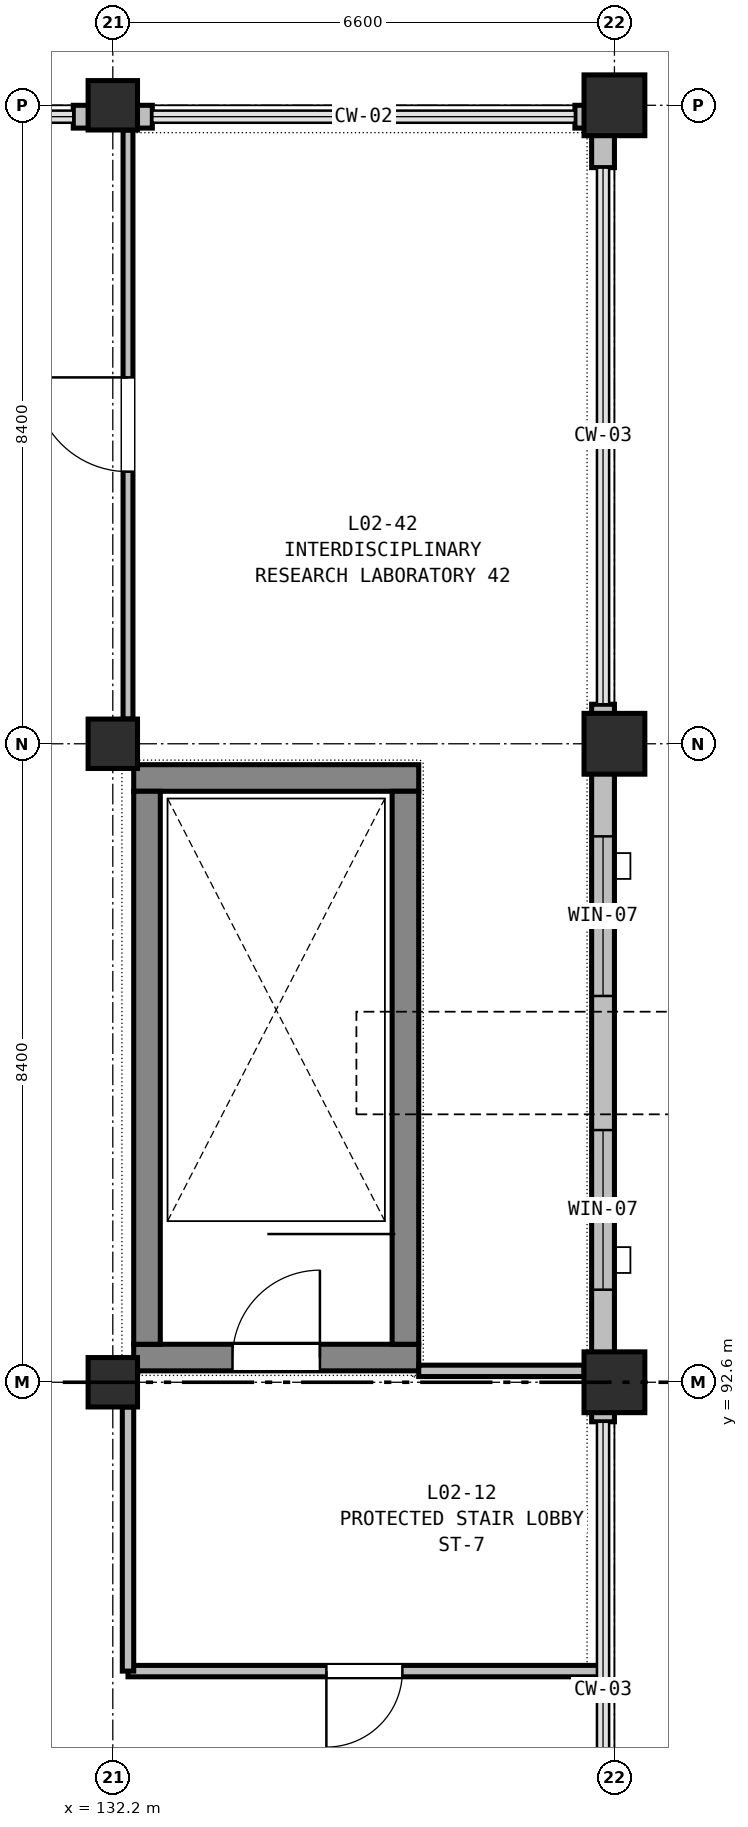
"""IFC4 building model, lengths in metres.
Left out: names, types, materials, properties, quantities, classifications, styles, units other than length and angle.
Written with IfcOpenShell. Run it as: python <this file> out.ifc"""

import sys

from ifc_helpers import new_model, si_unit, direction, frame, frame_2d, origin, origin_2d, place, context, subcontext, project, spatial, rectangle, extrude, element, fill, save


model = new_model("IFC4")
c1 = context("Model", 3, precision=1e-05, world=origin(), true_north=direction((0.0, 1.0)))
c2 = subcontext(c1, "Body", "Model", "MODEL_VIEW")
j1 = project(units=[si_unit("LENGTHUNIT", "METRE"), si_unit("PLANEANGLEUNIT", "RADIAN")], contexts=[c1])
p1 = place(None, origin())
s1 = spatial("IfcSite", under=j1, at=p1, CompositionType="ELEMENT")
p2 = place(p1, origin())
s2 = spatial("IfcBuilding", under=s1, at=p2, CompositionType="ELEMENT")
p3 = place(p2, frame((0.0, 0.0, 10.2)))
s3 = spatial("IfcBuildingStorey", under=s2, at=p3, CompositionType="ELEMENT", Elevation=10.2)
for number, where, z_axis, x_axis in (
    (1, (132.2, 92.6, 0.0), (0.0, 0.0, 1.0), (1.0, 0.0, 0.0)),
    (2, (132.2, 101.0, 0.0), (0.0, 0.0, 1.0), (1.0, 0.0, 0.0)),
    (3, (132.2, 109.4, 0.0), (0.0, 0.0, 1.0), (1.0, 0.0, 0.0)),
):
    element("IfcColumn", number, at=place(p3, frame(where, z_axis=z_axis, x_axis=x_axis)), inside=s3, PredefinedType="COLUMN", context=c2, shape_type="SweptSolid", body=[
        extrude(rectangle(XDim=0.65, YDim=0.65, at=origin_2d()), origin(), (0.0, 0.0, 1.0), 4.74),
    ])
for number, where, z_axis, x_axis in (
    (4, (138.8, 92.6, 0.0), (0.0, 0.0, 1.0), (1.0, 0.0, 0.0)),
    (5, (138.8, 101.0, 0.0), (0.0, 0.0, 1.0), (1.0, 0.0, 0.0)),
    (6, (138.8, 109.4, 0.0), (0.0, 0.0, 1.0), (1.0, 0.0, 0.0)),
):
    element("IfcColumn", number, at=place(p3, frame(where, z_axis=z_axis, x_axis=x_axis)), inside=s3, PredefinedType="COLUMN", context=c2, shape_type="SweptSolid", body=[
        extrude(rectangle(XDim=0.8, YDim=0.8, at=origin_2d()), origin(), (0.0, 0.0, 1.0), 4.74),
    ])
p4 = place(p3, frame((132.475, 92.925, 0.0), z_axis=(0.0, 0.0, 1.0), x_axis=(1.0, 0.0, 0.0)))
e7 = element("IfcWall", 7, at=p4, inside=s3, PredefinedType="SHEAR", context=c2, shape_type="SweptSolid", body=[
    extrude(rectangle(XDim=3.75, YDim=0.35, at=frame_2d((1.875, 0.0))), origin(), (0.0, 0.0, 1.0), 4.74),
])
p5 = place(p4, frame((1.3, 0.0, 0.0)))
e8 = element("IfcOpeningElement", 8, at=p5, cuts=e7, PredefinedType="OPENING", context=c2, shape_type="SweptSolid", body=[
    extrude(rectangle(XDim=1.15, YDim=2.15, at=frame_2d((0.575, 1.075))), frame((0.0, 0.185, 0.0), z_axis=(0.0, -1.0, 0.0), x_axis=(1.0, 0.0, 0.0)), (0.0, 0.0, 1.0), 0.37),
])
p6 = place(p3, frame((132.475, 100.55, 0.0), z_axis=(0.0, 0.0, 1.0), x_axis=(1.0, 0.0, 0.0)))
e9 = element("IfcWall", 9, at=p6, inside=s3, PredefinedType="SHEAR", context=c2, shape_type="SweptSolid", body=[
    extrude(rectangle(XDim=3.75, YDim=0.35, at=frame_2d((1.875, 0.0))), origin(), (0.0, 0.0, 1.0), 4.74),
])
for number, where, z_axis, x_axis in (
    (10, (132.65, 93.1, 0.0), (0.0, 0.0, 1.0), (0.0, 1.0, 0.0)),
    (11, (136.05, 93.1, 0.0), (0.0, 0.0, 1.0), (0.0, 1.0, 0.0)),
):
    element("IfcWall", number, at=place(p3, frame(where, z_axis=z_axis, x_axis=x_axis)), inside=s3, PredefinedType="SHEAR", context=c2, shape_type="SweptSolid", body=[
        extrude(rectangle(XDim=7.275, YDim=0.35, at=frame_2d((3.637, 0.0))), origin(), (0.0, 0.0, 1.0), 4.74),
    ])
for number, where, z_axis, x_axis in (
    (12, (131.68, 109.25, 0.0), (0.0, 0.0, 1.0), (1.0, 0.0, 0.0)),
    (13, (132.2, 109.25, 0.0), (0.0, 0.0, 1.0), (1.0, 0.0, 0.0)),
    (14, (138.28, 109.25, 0.0), (0.0, 0.0, 1.0), (1.0, 0.0, 0.0)),
    (15, (138.65, 109.1, 0.0), (0.0, 0.0, 1.0), (0.0, -1.0, 0.0)),
    (16, (138.65, 101.52, 0.0), (0.0, 0.0, 1.0), (0.0, -1.0, 0.0)),
):
    element("IfcWall", number, at=place(p3, frame(where, z_axis=z_axis, x_axis=x_axis)), inside=s3, PredefinedType="STANDARD", context=c2, shape_type="SweptSolid", body=[
        extrude(rectangle(XDim=0.52, YDim=0.3, at=frame_2d((0.26, 0.0))), origin(), (0.0, 0.0, 1.0), 3.935),
    ])
p7 = place(p3, frame((138.65, 101.0, 0.0), z_axis=(0.0, 0.0, 1.0), x_axis=(0.0, -1.0, 0.0)))
e17 = element("IfcWall", 17, at=p7, inside=s3, PredefinedType="STANDARD", context=c2, shape_type="SweptSolid", body=[
    extrude(rectangle(XDim=8.4, YDim=0.3, at=frame_2d((4.2, 0.0))), origin(), (0.0, 0.0, 1.0), 3.935),
])
p8 = place(p7, frame((1.218, 0.0, 0.9)))
e18 = element("IfcOpeningElement", 18, at=p8, cuts=e17, PredefinedType="OPENING", context=c2, shape_type="SweptSolid", body=[
    extrude(rectangle(XDim=2.1, YDim=2.1, at=frame_2d((1.05, 1.05))), frame((0.0, 0.16, 0.0), z_axis=(0.0, -1.0, 0.0), x_axis=(1.0, 0.0, 0.0)), (0.0, 0.0, 1.0), 0.32),
])
p9 = place(p7, frame((5.082, 0.0, 0.9)))
e19 = element("IfcOpeningElement", 19, at=p9, cuts=e17, PredefinedType="OPENING", context=c2, shape_type="SweptSolid", body=[
    extrude(rectangle(XDim=2.1, YDim=2.1, at=frame_2d((1.05, 1.05))), frame((0.0, 0.16, 0.0), z_axis=(0.0, -1.0, 0.0), x_axis=(1.0, 0.0, 0.0)), (0.0, 0.0, 1.0), 0.32),
])
p10 = place(p3, frame((138.65, 92.6, 0.0), z_axis=(0.0, 0.0, 1.0), x_axis=(0.0, -1.0, 0.0)))
e20 = element("IfcWall", 20, at=p10, inside=s3, PredefinedType="STANDARD", context=c2, shape_type="SweptSolid", body=[
    extrude(rectangle(XDim=0.52, YDim=0.3, at=frame_2d((0.26, 0.0))), origin(), (0.0, 0.0, 1.0), 3.935),
])
p11 = place(p3, frame((136.225, 92.75, 0.0), z_axis=(0.0, 0.0, 1.0), x_axis=(1.0, 0.0, 0.0)))
e21 = element("IfcWall", 21, at=p11, inside=s3, PredefinedType="PARTITIONING", context=c2, shape_type="SweptSolid", body=[
    extrude(rectangle(XDim=2.175, YDim=0.15, at=frame_2d((1.087, 0.0))), origin(), (0.0, 0.0, 1.0), 4.135),
])
p12 = place(p3, frame((138.62, 88.8, 0.0), z_axis=(0.0, 0.0, 1.0), x_axis=(-1.0, 0.0, 0.0)))
e22 = element("IfcWall", 22, at=p12, inside=s3, PredefinedType="PARTITIONING", context=c2, shape_type="SweptSolid", body=[
    extrude(rectangle(XDim=6.22, YDim=0.15, at=frame_2d((3.11, 0.0))), origin(), (0.0, 0.0, 1.0), 3.935),
])
p13 = place(p12, frame((2.61, 0.0, 0.0)))
e23 = element("IfcOpeningElement", 23, at=p13, cuts=e22, PredefinedType="OPENING", context=c2, shape_type="SweptSolid", body=[
    extrude(rectangle(XDim=1.0, YDim=2.1, at=frame_2d((0.5, 1.05))), frame((0.0, 0.085, 0.0), z_axis=(0.0, -1.0, 0.0), x_axis=(1.0, 0.0, 0.0)), (0.0, 0.0, 1.0), 0.17),
])
p14 = place(p3, frame((132.4, 88.8, 0.0), z_axis=(0.0, 0.0, 1.0), x_axis=(0.0, 1.0, 0.0)))
e24 = element("IfcWall", 24, at=p14, inside=s3, PredefinedType="PARTITIONING", context=c2, shape_type="SweptSolid", body=[
    extrude(rectangle(XDim=3.475, YDim=0.15, at=frame_2d((1.737, 0.0))), origin(), (0.0, 0.0, 1.0), 3.935),
])
p15 = place(p3, frame((132.4, 101.325, 0.0), z_axis=(0.0, 0.0, 1.0), x_axis=(0.0, 1.0, 0.0)))
e25 = element("IfcWall", 25, at=p15, inside=s3, PredefinedType="PARTITIONING", context=c2, shape_type="SweptSolid", body=[
    extrude(rectangle(XDim=7.75, YDim=0.13, at=frame_2d((3.875, 0.0))), origin(), (0.0, 0.0, 1.0), 3.935),
])
p16 = place(p15, frame((3.255, 0.0, 0.0)))
e26 = element("IfcOpeningElement", 26, at=p16, cuts=e25, PredefinedType="OPENING", context=c2, shape_type="SweptSolid", body=[
    extrude(rectangle(XDim=1.24, YDim=2.14, at=frame_2d((0.62, 1.07))), frame((0.0, 0.075, 0.0), z_axis=(0.0, -1.0, 0.0), x_axis=(1.0, 0.0, 0.0)), (0.0, 0.0, 1.0), 0.15),
])
p17 = place(p8, origin())
e27 = element("IfcWindow", 27, at=p17, inside=s3, PartitioningType="SINGLE_PANEL", PredefinedType="WINDOW", context=c2, shape_type="SweptSolid", body=[
    extrude(rectangle(XDim=2.1, YDim=2.1, at=frame_2d((1.05, 1.05))), frame((0.0, 0.03, 0.0), z_axis=(0.0, -1.0, 0.0), x_axis=(1.0, 0.0, 0.0)), (0.0, 0.0, 1.0), 0.06),
])
fill(e18, e27)
p18 = place(p9, origin())
e28 = element("IfcWindow", 28, at=p18, inside=s3, PartitioningType="SINGLE_PANEL", PredefinedType="WINDOW", context=c2, shape_type="SweptSolid", body=[
    extrude(rectangle(XDim=2.1, YDim=2.1, at=frame_2d((1.05, 1.05))), frame((0.0, 0.03, 0.0), z_axis=(0.0, -1.0, 0.0), x_axis=(1.0, 0.0, 0.0)), (0.0, 0.0, 1.0), 0.06),
])
fill(e19, e28)
p19 = place(p5, origin())
e29 = element("IfcDoor", 29, at=p19, inside=s3, OperationType="SINGLE_SWING_RIGHT", PredefinedType="DOOR", context=c2, shape_type="SweptSolid", body=[
    extrude(rectangle(XDim=1.15, YDim=2.15, at=frame_2d((0.575, 1.075))), frame((0.0, 0.025, 0.0), z_axis=(0.0, -1.0, 0.0), x_axis=(1.0, 0.0, 0.0)), (0.0, 0.0, 1.0), 0.05),
])
fill(e8, e29)
p20 = place(p13, origin())
e30 = element("IfcDoor", 30, at=p20, inside=s3, OperationType="SINGLE_SWING_RIGHT", PredefinedType="DOOR", context=c2, shape_type="SweptSolid", body=[
    extrude(rectangle(XDim=1.0, YDim=2.1, at=frame_2d((0.5, 1.05))), frame((0.0, 0.025, 0.0), z_axis=(0.0, -1.0, 0.0), x_axis=(1.0, 0.0, 0.0)), (0.0, 0.0, 1.0), 0.05),
])
fill(e23, e30)
p21 = place(p16, origin())
e31 = element("IfcDoor", 31, at=p21, inside=s3, OperationType="SINGLE_SWING_RIGHT", PredefinedType="DOOR", context=c2, shape_type="SweptSolid", body=[
    extrude(rectangle(XDim=1.24, YDim=2.14, at=frame_2d((0.62, 1.07))), frame((0.0, 0.025, 0.0), z_axis=(0.0, -1.0, 0.0), x_axis=(1.0, 0.0, 0.0)), (0.0, 0.0, 1.0), 0.05),
])
fill(e26, e31)
save(model, sys.argv[1])
